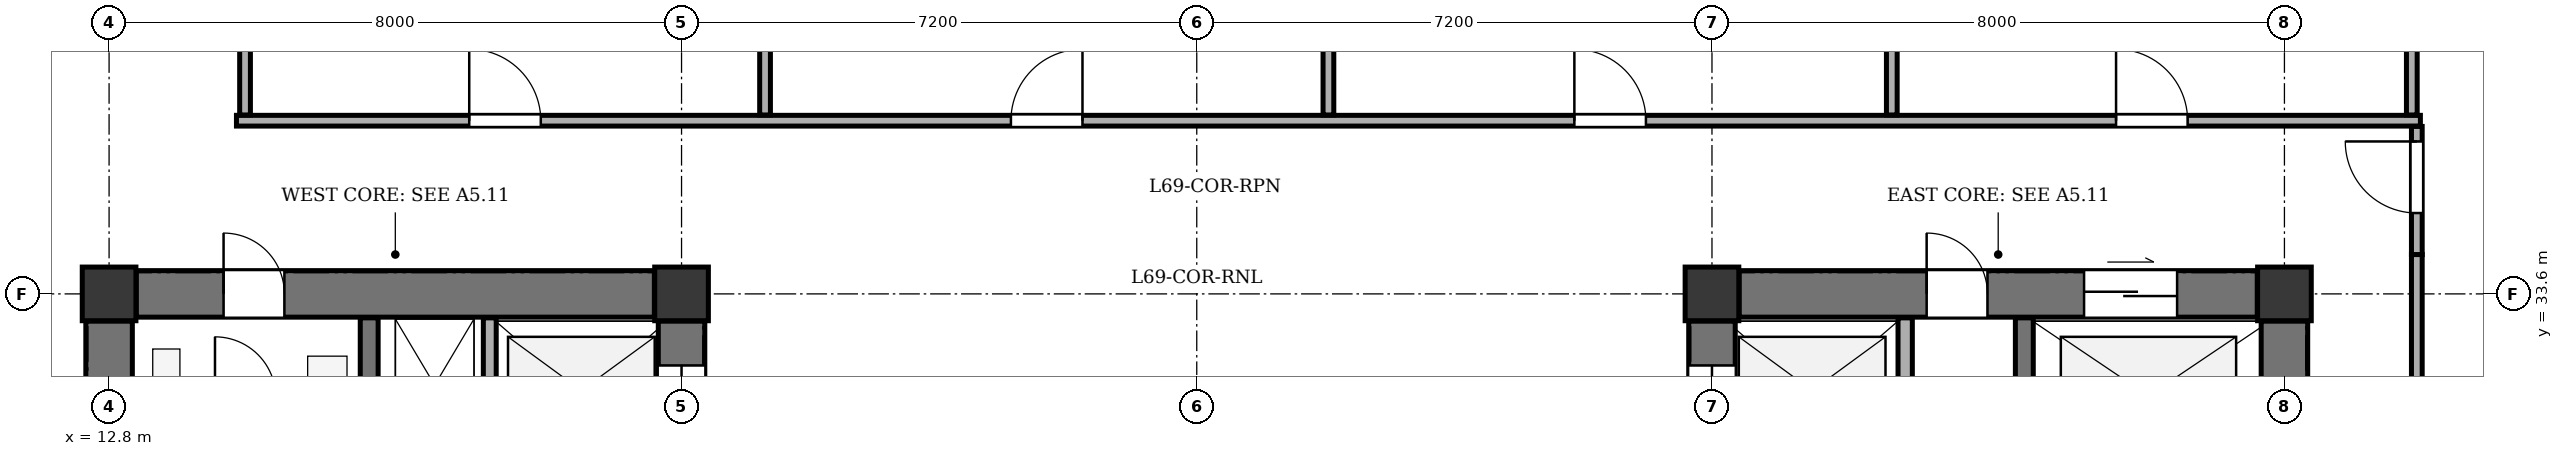
"""IFC4 building model, lengths in metres.
Left out: names, types, materials, properties, quantities, classifications, styles, units other than length and angle.
Written with IfcOpenShell. Run it as: python <this file> out.ifc"""

import sys

from ifc_helpers import new_model, si_unit, direction, frame, frame_2d, origin, origin_2d, place, context, subcontext, project, spatial, rectangle, extrude, element, fill, save


model = new_model("IFC4")
c1 = context("Model", 3, precision=1e-05, world=origin(), true_north=direction((0.0, 1.0)))
c2 = subcontext(c1, "Body", "Model", "MODEL_VIEW")
j1 = project(units=[si_unit("LENGTHUNIT", "METRE"), si_unit("PLANEANGLEUNIT", "RADIAN")], contexts=[c1])
p1 = place(None, origin())
s1 = spatial("IfcSite", under=j1, at=p1, CompositionType="ELEMENT")
p2 = place(p1, origin())
s2 = spatial("IfcBuilding", under=s1, at=p2, CompositionType="ELEMENT")
p3 = place(p2, frame((0.0, 0.0, 261.9)))
s3 = spatial("IfcBuildingStorey", under=s2, at=p3, CompositionType="ELEMENT", Elevation=261.9)
for number, where, z_axis, x_axis in (
    (1, (12.8, 33.6, 0.0), (0.0, 0.0, 1.0), (1.0, 0.0, 0.0)),
    (2, (20.8, 33.6, 0.0), (0.0, 0.0, 1.0), (1.0, 0.0, 0.0)),
    (3, (35.2, 33.6, 0.0), (0.0, 0.0, 1.0), (1.0, 0.0, 0.0)),
    (4, (43.2, 33.6, 0.0), (0.0, 0.0, 1.0), (1.0, 0.0, 0.0)),
):
    element("IfcColumn", number, at=place(p3, frame(where, z_axis=z_axis, x_axis=x_axis)), inside=s3, PredefinedType="COLUMN", context=c2, shape_type="SweptSolid", body=[
        extrude(rectangle(XDim=0.75, YDim=0.75, at=origin_2d()), origin(), (0.0, 0.0, 1.0), 3.4),
    ])
p4 = place(p3, frame((12.8, 21.18, 0.0), z_axis=(0.0, 0.0, 1.0), x_axis=(0.0, 1.0, 0.0)))
e5 = element("IfcWall", 5, at=p4, inside=s3, PredefinedType="SHEAR", context=c2, shape_type="SweptSolid", body=[
    extrude(rectangle(XDim=12.04, YDim=0.65, at=frame_2d((6.02, 0.0))), origin(), (0.0, 0.0, 1.0), 3.1),
])
p5 = place(p3, frame((13.18, 33.6, 0.0), z_axis=(0.0, 0.0, 1.0), x_axis=(1.0, 0.0, 0.0)))
e6 = element("IfcWall", 6, at=p5, inside=s3, PredefinedType="SHEAR", context=c2, shape_type="SweptSolid", body=[
    extrude(rectangle(XDim=7.24, YDim=0.65, at=frame_2d((3.62, 0.0))), origin(), (0.0, 0.0, 1.0), 3.1),
])
p6 = place(p5, frame((1.22, 0.0, 0.0)))
e7 = element("IfcOpeningElement", 7, at=p6, cuts=e6, PredefinedType="OPENING", context=c2, shape_type="SweptSolid", body=[
    extrude(rectangle(XDim=0.85, YDim=2.02, at=frame_2d((0.425, 1.01))), frame((0.0, 0.335, 0.0), z_axis=(0.0, -1.0, 0.0), x_axis=(1.0, 0.0, 0.0)), (0.0, 0.0, 1.0), 0.67),
])
p7 = place(p3, frame((20.8, 31.1, 0.0), z_axis=(0.0, 0.0, 1.0), x_axis=(0.0, 1.0, 0.0)))
e8 = element("IfcWall", 8, at=p7, inside=s3, PredefinedType="SHEAR", context=c2, shape_type="SweptSolid", body=[
    extrude(rectangle(XDim=2.12, YDim=0.65, at=frame_2d((1.06, 0.0))), origin(), (0.0, 0.0, 1.0), 3.1),
])
p8 = place(p7, frame((0.4, 0.0, 0.0)))
e9 = element("IfcOpeningElement", 9, at=p8, cuts=e8, PredefinedType="OPENING", context=c2, shape_type="SweptSolid", body=[
    extrude(rectangle(XDim=1.1, YDim=2.1, at=frame_2d((0.55, 1.05))), frame((0.0, 0.335, 0.0), z_axis=(0.0, -1.0, 0.0), x_axis=(1.0, 0.0, 0.0)), (0.0, 0.0, 1.0), 0.67),
])
p9 = place(p3, frame((16.435, 21.135, 0.0), z_axis=(0.0, 0.0, 1.0), x_axis=(0.0, 1.0, 0.0)))
e10 = element("IfcWall", 10, at=p9, inside=s3, PredefinedType="SHEAR", context=c2, shape_type="SweptSolid", body=[
    extrude(rectangle(XDim=12.13, YDim=0.25, at=frame_2d((6.065, 0.0))), origin(), (0.0, 0.0, 1.0), 3.1),
])
p10 = place(p9, frame((0.515, 0.0, 0.0)))
e11 = element("IfcOpeningElement", 11, at=p10, cuts=e10, PredefinedType="OPENING", context=c2, shape_type="SweptSolid", body=[
    extrude(rectangle(XDim=1.2, YDim=2.15, at=frame_2d((0.6, 1.075))), frame((0.0, 0.135, 0.0), z_axis=(0.0, -1.0, 0.0), x_axis=(1.0, 0.0, 0.0)), (0.0, 0.0, 1.0), 0.27),
])
p11 = place(p9, frame((2.665, 0.0, 0.0)))
e12 = element("IfcOpeningElement", 12, at=p11, cuts=e10, PredefinedType="OPENING", context=c2, shape_type="SweptSolid", body=[
    extrude(rectangle(XDim=1.15, YDim=2.15, at=frame_2d((0.575, 1.075))), frame((0.0, 0.135, 0.0), z_axis=(0.0, -1.0, 0.0), x_axis=(1.0, 0.0, 0.0)), (0.0, 0.0, 1.0), 0.27),
])
p12 = place(p3, frame((18.12, 31.17, 0.0), z_axis=(0.0, 0.0, 1.0), x_axis=(0.0, 1.0, 0.0)))
e13 = element("IfcWall", 13, at=p12, inside=s3, PredefinedType="PARTITIONING", context=c2, shape_type="SweptSolid", body=[
    extrude(rectangle(XDim=2.095, YDim=0.18, at=frame_2d((1.047, 0.0))), origin(), (0.0, 0.0, 1.0), 3.1),
])
p13 = place(p3, frame((43.2, 21.18, 0.0), z_axis=(0.0, 0.0, 1.0), x_axis=(0.0, 1.0, 0.0)))
e14 = element("IfcWall", 14, at=p13, inside=s3, PredefinedType="SHEAR", context=c2, shape_type="SweptSolid", body=[
    extrude(rectangle(XDim=12.04, YDim=0.65, at=frame_2d((6.02, 0.0))), origin(), (0.0, 0.0, 1.0), 3.1),
])
p14 = place(p3, frame((35.58, 33.6, 0.0), z_axis=(0.0, 0.0, 1.0), x_axis=(1.0, 0.0, 0.0)))
e15 = element("IfcWall", 15, at=p14, inside=s3, PredefinedType="SHEAR", context=c2, shape_type="SweptSolid", body=[
    extrude(rectangle(XDim=7.24, YDim=0.65, at=frame_2d((3.62, 0.0))), origin(), (0.0, 0.0, 1.0), 3.1),
])
p15 = place(p14, frame((4.82, 0.0, 0.0)))
e16 = element("IfcOpeningElement", 16, at=p15, cuts=e15, PredefinedType="OPENING", context=c2, shape_type="SweptSolid", body=[
    extrude(rectangle(XDim=1.3, YDim=2.15, at=frame_2d((0.65, 1.075))), frame((0.0, 0.335, 0.0), z_axis=(0.0, -1.0, 0.0), x_axis=(1.0, 0.0, 0.0)), (0.0, 0.0, 1.0), 0.67),
])
p16 = place(p14, frame((2.62, 0.0, 0.0)))
e17 = element("IfcOpeningElement", 17, at=p16, cuts=e15, PredefinedType="OPENING", context=c2, shape_type="SweptSolid", body=[
    extrude(rectangle(XDim=0.85, YDim=2.02, at=frame_2d((0.425, 1.01))), frame((0.0, 0.335, 0.0), z_axis=(0.0, -1.0, 0.0), x_axis=(1.0, 0.0, 0.0)), (0.0, 0.0, 1.0), 0.67),
])
p17 = place(p3, frame((35.2, 31.1, 0.0), z_axis=(0.0, 0.0, 1.0), x_axis=(0.0, 1.0, 0.0)))
e18 = element("IfcWall", 18, at=p17, inside=s3, PredefinedType="SHEAR", context=c2, shape_type="SweptSolid", body=[
    extrude(rectangle(XDim=2.12, YDim=0.65, at=frame_2d((1.06, 0.0))), origin(), (0.0, 0.0, 1.0), 3.1),
])
p18 = place(p17, frame((0.4, 0.0, 0.0)))
e19 = element("IfcOpeningElement", 19, at=p18, cuts=e18, PredefinedType="OPENING", context=c2, shape_type="SweptSolid", body=[
    extrude(rectangle(XDim=1.1, YDim=2.1, at=frame_2d((0.55, 1.05))), frame((0.0, 0.335, 0.0), z_axis=(0.0, -1.0, 0.0), x_axis=(1.0, 0.0, 0.0)), (0.0, 0.0, 1.0), 0.67),
])
p19 = place(p3, frame((39.565, 21.135, 0.0), z_axis=(0.0, 0.0, 1.0), x_axis=(0.0, 1.0, 0.0)))
e20 = element("IfcWall", 20, at=p19, inside=s3, PredefinedType="SHEAR", context=c2, shape_type="SweptSolid", body=[
    extrude(rectangle(XDim=12.13, YDim=0.25, at=frame_2d((6.065, 0.0))), origin(), (0.0, 0.0, 1.0), 3.1),
])
p20 = place(p19, frame((0.515, 0.0, 0.0)))
e21 = element("IfcOpeningElement", 21, at=p20, cuts=e20, PredefinedType="OPENING", context=c2, shape_type="SweptSolid", body=[
    extrude(rectangle(XDim=1.2, YDim=2.15, at=frame_2d((0.6, 1.075))), frame((0.0, 0.135, 0.0), z_axis=(0.0, -1.0, 0.0), x_axis=(1.0, 0.0, 0.0)), (0.0, 0.0, 1.0), 0.27),
])
p21 = place(p19, frame((2.665, 0.0, 0.0)))
e22 = element("IfcOpeningElement", 22, at=p21, cuts=e20, PredefinedType="OPENING", context=c2, shape_type="SweptSolid", body=[
    extrude(rectangle(XDim=1.15, YDim=2.15, at=frame_2d((0.575, 1.075))), frame((0.0, 0.135, 0.0), z_axis=(0.0, -1.0, 0.0), x_axis=(1.0, 0.0, 0.0)), (0.0, 0.0, 1.0), 0.27),
])
p22 = place(p3, frame((37.9, 25.27, 0.0), z_axis=(0.0, 0.0, 1.0), x_axis=(0.0, 1.0, 0.0)))
e23 = element("IfcWall", 23, at=p22, inside=s3, PredefinedType="SOLIDWALL", context=c2, shape_type="SweptSolid", body=[
    extrude(rectangle(XDim=7.995, YDim=0.2, at=frame_2d((3.998, 0.0))), origin(), (0.0, 0.0, 1.0), 3.1),
])
p23 = place(p3, frame((14.58, 36.02, 0.0), z_axis=(0.0, 0.0, 1.0), x_axis=(1.0, 0.0, 0.0)))
e24 = element("IfcWall", 24, at=p23, inside=s3, PredefinedType="PARTITIONING", context=c2, shape_type="SweptSolid", body=[
    extrude(rectangle(XDim=30.52, YDim=0.15, at=frame_2d((15.26, 0.0))), origin(), (0.0, 0.0, 1.0), 3.1),
])
p24 = place(p23, frame((3.253, 0.0, 0.0)))
e25 = element("IfcOpeningElement", 25, at=p24, cuts=e24, PredefinedType="OPENING", context=c2, shape_type="SweptSolid", body=[
    extrude(rectangle(XDim=1.0, YDim=2.1, at=frame_2d((0.5, 1.05))), frame((0.0, 0.085, 0.0), z_axis=(0.0, -1.0, 0.0), x_axis=(1.0, 0.0, 0.0)), (0.0, 0.0, 1.0), 0.17),
])
p25 = place(p23, frame((10.823, 0.0, 0.0)))
e26 = element("IfcOpeningElement", 26, at=p25, cuts=e24, PredefinedType="OPENING", context=c2, shape_type="SweptSolid", body=[
    extrude(rectangle(XDim=1.0, YDim=2.1, at=frame_2d((0.5, 1.05))), frame((0.0, 0.085, 0.0), z_axis=(0.0, -1.0, 0.0), x_axis=(1.0, 0.0, 0.0)), (0.0, 0.0, 1.0), 0.17),
])
p26 = place(p23, frame((18.697, 0.0, 0.0)))
e27 = element("IfcOpeningElement", 27, at=p26, cuts=e24, PredefinedType="OPENING", context=c2, shape_type="SweptSolid", body=[
    extrude(rectangle(XDim=1.0, YDim=2.1, at=frame_2d((0.5, 1.05))), frame((0.0, 0.085, 0.0), z_axis=(0.0, -1.0, 0.0), x_axis=(1.0, 0.0, 0.0)), (0.0, 0.0, 1.0), 0.17),
])
p27 = place(p23, frame((26.267, 0.0, 0.0)))
e28 = element("IfcOpeningElement", 28, at=p27, cuts=e24, PredefinedType="OPENING", context=c2, shape_type="SweptSolid", body=[
    extrude(rectangle(XDim=1.0, YDim=2.1, at=frame_2d((0.5, 1.05))), frame((0.0, 0.085, 0.0), z_axis=(0.0, -1.0, 0.0), x_axis=(1.0, 0.0, 0.0)), (0.0, 0.0, 1.0), 0.17),
])
for number, where, z_axis, x_axis in (
    (29, (14.7, 36.1, 0.0), (0.0, 0.0, 1.0), (0.0, 1.0, 0.0)),
    (30, (21.967, 36.1, 0.0), (0.0, 0.0, 1.0), (0.0, 1.0, 0.0)),
):
    element("IfcWall", number, at=place(p3, frame(where, z_axis=z_axis, x_axis=x_axis)), inside=s3, PredefinedType="PARTITIONING", context=c2, shape_type="SweptSolid", body=[
        extrude(rectangle(XDim=8.655, YDim=0.15, at=frame_2d((4.327, 0.0))), origin(), (0.0, 0.0, 1.0), 3.1),
    ])
p28 = place(p3, frame((29.84, 36.1, 0.0), z_axis=(0.0, 0.0, 1.0), x_axis=(0.0, 1.0, 0.0)))
e31 = element("IfcWall", 31, at=p28, inside=s3, PredefinedType="PARTITIONING", context=c2, shape_type="SweptSolid", body=[
    extrude(rectangle(XDim=8.655, YDim=0.15, at=frame_2d((4.327, 0.0))), origin(), (0.0, 0.0, 1.0), 2.725),
])
p29 = place(p3, frame((37.713, 36.1, 0.0), z_axis=(0.0, 0.0, 1.0), x_axis=(0.0, 1.0, 0.0)))
e32 = element("IfcWall", 32, at=p29, inside=s3, PredefinedType="PARTITIONING", context=c2, shape_type="SweptSolid", body=[
    extrude(rectangle(XDim=8.655, YDim=0.15, at=frame_2d((4.327, 0.0))), origin(), (0.0, 0.0, 1.0), 3.1),
])
p30 = place(p3, frame((44.98, 36.1, 0.0), z_axis=(0.0, 0.0, 1.0), x_axis=(0.0, 1.0, 0.0)))
e33 = element("IfcWall", 33, at=p30, inside=s3, PredefinedType="PARTITIONING", context=c2, shape_type="SweptSolid", body=[
    extrude(rectangle(XDim=8.655, YDim=0.15, at=frame_2d((4.327, 0.0))), origin(), (0.0, 0.0, 1.0), 2.725),
])
p31 = place(p3, frame((45.05, 20.25, 0.0), z_axis=(0.0, 0.0, 1.0), x_axis=(0.0, 1.0, 0.0)))
e34 = element("IfcWall", 34, at=p31, inside=s3, PredefinedType="PARTITIONING", context=c2, shape_type="SweptSolid", body=[
    extrude(rectangle(XDim=13.9, YDim=0.15, at=frame_2d((6.95, 0.0))), origin(), (0.0, 0.0, 1.0), 2.725),
])
p32 = place(p3, frame((45.05, 34.15, 0.0), z_axis=(0.0, 0.0, 1.0), x_axis=(0.0, 1.0, 0.0)))
e35 = element("IfcWall", 35, at=p32, inside=s3, PredefinedType="PARTITIONING", context=c2, shape_type="SweptSolid", body=[
    extrude(rectangle(XDim=1.79, YDim=0.15, at=frame_2d((0.895, 0.0))), origin(), (0.0, 0.0, 1.0), 2.725),
])
p33 = place(p32, frame((0.58, 0.0, 0.0)))
e36 = element("IfcOpeningElement", 36, at=p33, cuts=e35, PredefinedType="OPENING", context=c2, shape_type="SweptSolid", body=[
    extrude(rectangle(XDim=1.0, YDim=2.1, at=frame_2d((0.5, 1.05))), frame((0.0, 0.085, 0.0), z_axis=(0.0, -1.0, 0.0), x_axis=(1.0, 0.0, 0.0)), (0.0, 0.0, 1.0), 0.17),
])
p34 = place(p6, origin())
e37 = element("IfcDoor", 37, at=p34, inside=s3, OperationType="SINGLE_SWING_LEFT", PredefinedType="DOOR", context=c2, shape_type="SweptSolid", body=[
    extrude(rectangle(XDim=0.85, YDim=2.02, at=frame_2d((0.425, 1.01))), frame((0.0, 0.025, 0.0), z_axis=(0.0, -1.0, 0.0), x_axis=(1.0, 0.0, 0.0)), (0.0, 0.0, 1.0), 0.05),
])
fill(e7, e37)
p35 = place(p8, origin())
e38 = element("IfcDoor", 38, at=p35, inside=s3, OperationType="DOUBLE_DOOR_SLIDING", PredefinedType="DOOR", context=c2, shape_type="SweptSolid", body=[
    extrude(rectangle(XDim=1.1, YDim=2.1, at=frame_2d((0.55, 1.05))), frame((0.0, 0.025, 0.0), z_axis=(0.0, -1.0, 0.0), x_axis=(1.0, 0.0, 0.0)), (0.0, 0.0, 1.0), 0.05),
])
fill(e9, e38)
p36 = place(p15, origin())
e39 = element("IfcDoor", 39, at=p36, inside=s3, OperationType="DOUBLE_DOOR_SLIDING", PredefinedType="DOOR", context=c2, shape_type="SweptSolid", body=[
    extrude(rectangle(XDim=1.3, YDim=2.15, at=frame_2d((0.65, 1.075))), frame((0.0, 0.025, 0.0), z_axis=(0.0, -1.0, 0.0), x_axis=(1.0, 0.0, 0.0)), (0.0, 0.0, 1.0), 0.05),
])
fill(e16, e39)
p37 = place(p16, origin())
e40 = element("IfcDoor", 40, at=p37, inside=s3, OperationType="SINGLE_SWING_LEFT", PredefinedType="DOOR", context=c2, shape_type="SweptSolid", body=[
    extrude(rectangle(XDim=0.85, YDim=2.02, at=frame_2d((0.425, 1.01))), frame((0.0, 0.025, 0.0), z_axis=(0.0, -1.0, 0.0), x_axis=(1.0, 0.0, 0.0)), (0.0, 0.0, 1.0), 0.05),
])
fill(e17, e40)
p38 = place(p18, origin())
e41 = element("IfcDoor", 41, at=p38, inside=s3, OperationType="DOUBLE_DOOR_SLIDING", PredefinedType="DOOR", context=c2, shape_type="SweptSolid", body=[
    extrude(rectangle(XDim=1.1, YDim=2.1, at=frame_2d((0.55, 1.05))), frame((0.0, 0.025, 0.0), z_axis=(0.0, -1.0, 0.0), x_axis=(1.0, 0.0, 0.0)), (0.0, 0.0, 1.0), 0.05),
])
fill(e19, e41)
p39 = place(p24, origin())
e42 = element("IfcDoor", 42, at=p39, inside=s3, OperationType="SINGLE_SWING_LEFT", PredefinedType="DOOR", context=c2, shape_type="SweptSolid", body=[
    extrude(rectangle(XDim=1.0, YDim=2.1, at=frame_2d((0.5, 1.05))), frame((0.0, 0.025, 0.0), z_axis=(0.0, -1.0, 0.0), x_axis=(1.0, 0.0, 0.0)), (0.0, 0.0, 1.0), 0.05),
])
fill(e25, e42)
p40 = place(p25, origin())
e43 = element("IfcDoor", 43, at=p40, inside=s3, OperationType="SINGLE_SWING_RIGHT", PredefinedType="DOOR", context=c2, shape_type="SweptSolid", body=[
    extrude(rectangle(XDim=1.0, YDim=2.1, at=frame_2d((0.5, 1.05))), frame((0.0, 0.025, 0.0), z_axis=(0.0, -1.0, 0.0), x_axis=(1.0, 0.0, 0.0)), (0.0, 0.0, 1.0), 0.05),
])
fill(e26, e43)
p41 = place(p26, origin())
e44 = element("IfcDoor", 44, at=p41, inside=s3, OperationType="SINGLE_SWING_LEFT", PredefinedType="DOOR", context=c2, shape_type="SweptSolid", body=[
    extrude(rectangle(XDim=1.0, YDim=2.1, at=frame_2d((0.5, 1.05))), frame((0.0, 0.025, 0.0), z_axis=(0.0, -1.0, 0.0), x_axis=(1.0, 0.0, 0.0)), (0.0, 0.0, 1.0), 0.05),
])
fill(e27, e44)
p42 = place(p27, origin())
e45 = element("IfcDoor", 45, at=p42, inside=s3, OperationType="SINGLE_SWING_LEFT", PredefinedType="DOOR", context=c2, shape_type="SweptSolid", body=[
    extrude(rectangle(XDim=1.0, YDim=2.1, at=frame_2d((0.5, 1.05))), frame((0.0, 0.025, 0.0), z_axis=(0.0, -1.0, 0.0), x_axis=(1.0, 0.0, 0.0)), (0.0, 0.0, 1.0), 0.05),
])
fill(e28, e45)
p43 = place(p33, origin())
e46 = element("IfcDoor", 46, at=p43, inside=s3, OperationType="SINGLE_SWING_RIGHT", PredefinedType="DOOR", context=c2, shape_type="SweptSolid", body=[
    extrude(rectangle(XDim=1.0, YDim=2.1, at=frame_2d((0.5, 1.05))), frame((0.0, 0.025, 0.0), z_axis=(0.0, -1.0, 0.0), x_axis=(1.0, 0.0, 0.0)), (0.0, 0.0, 1.0), 0.05),
])
fill(e36, e46)
save(model, sys.argv[1])
